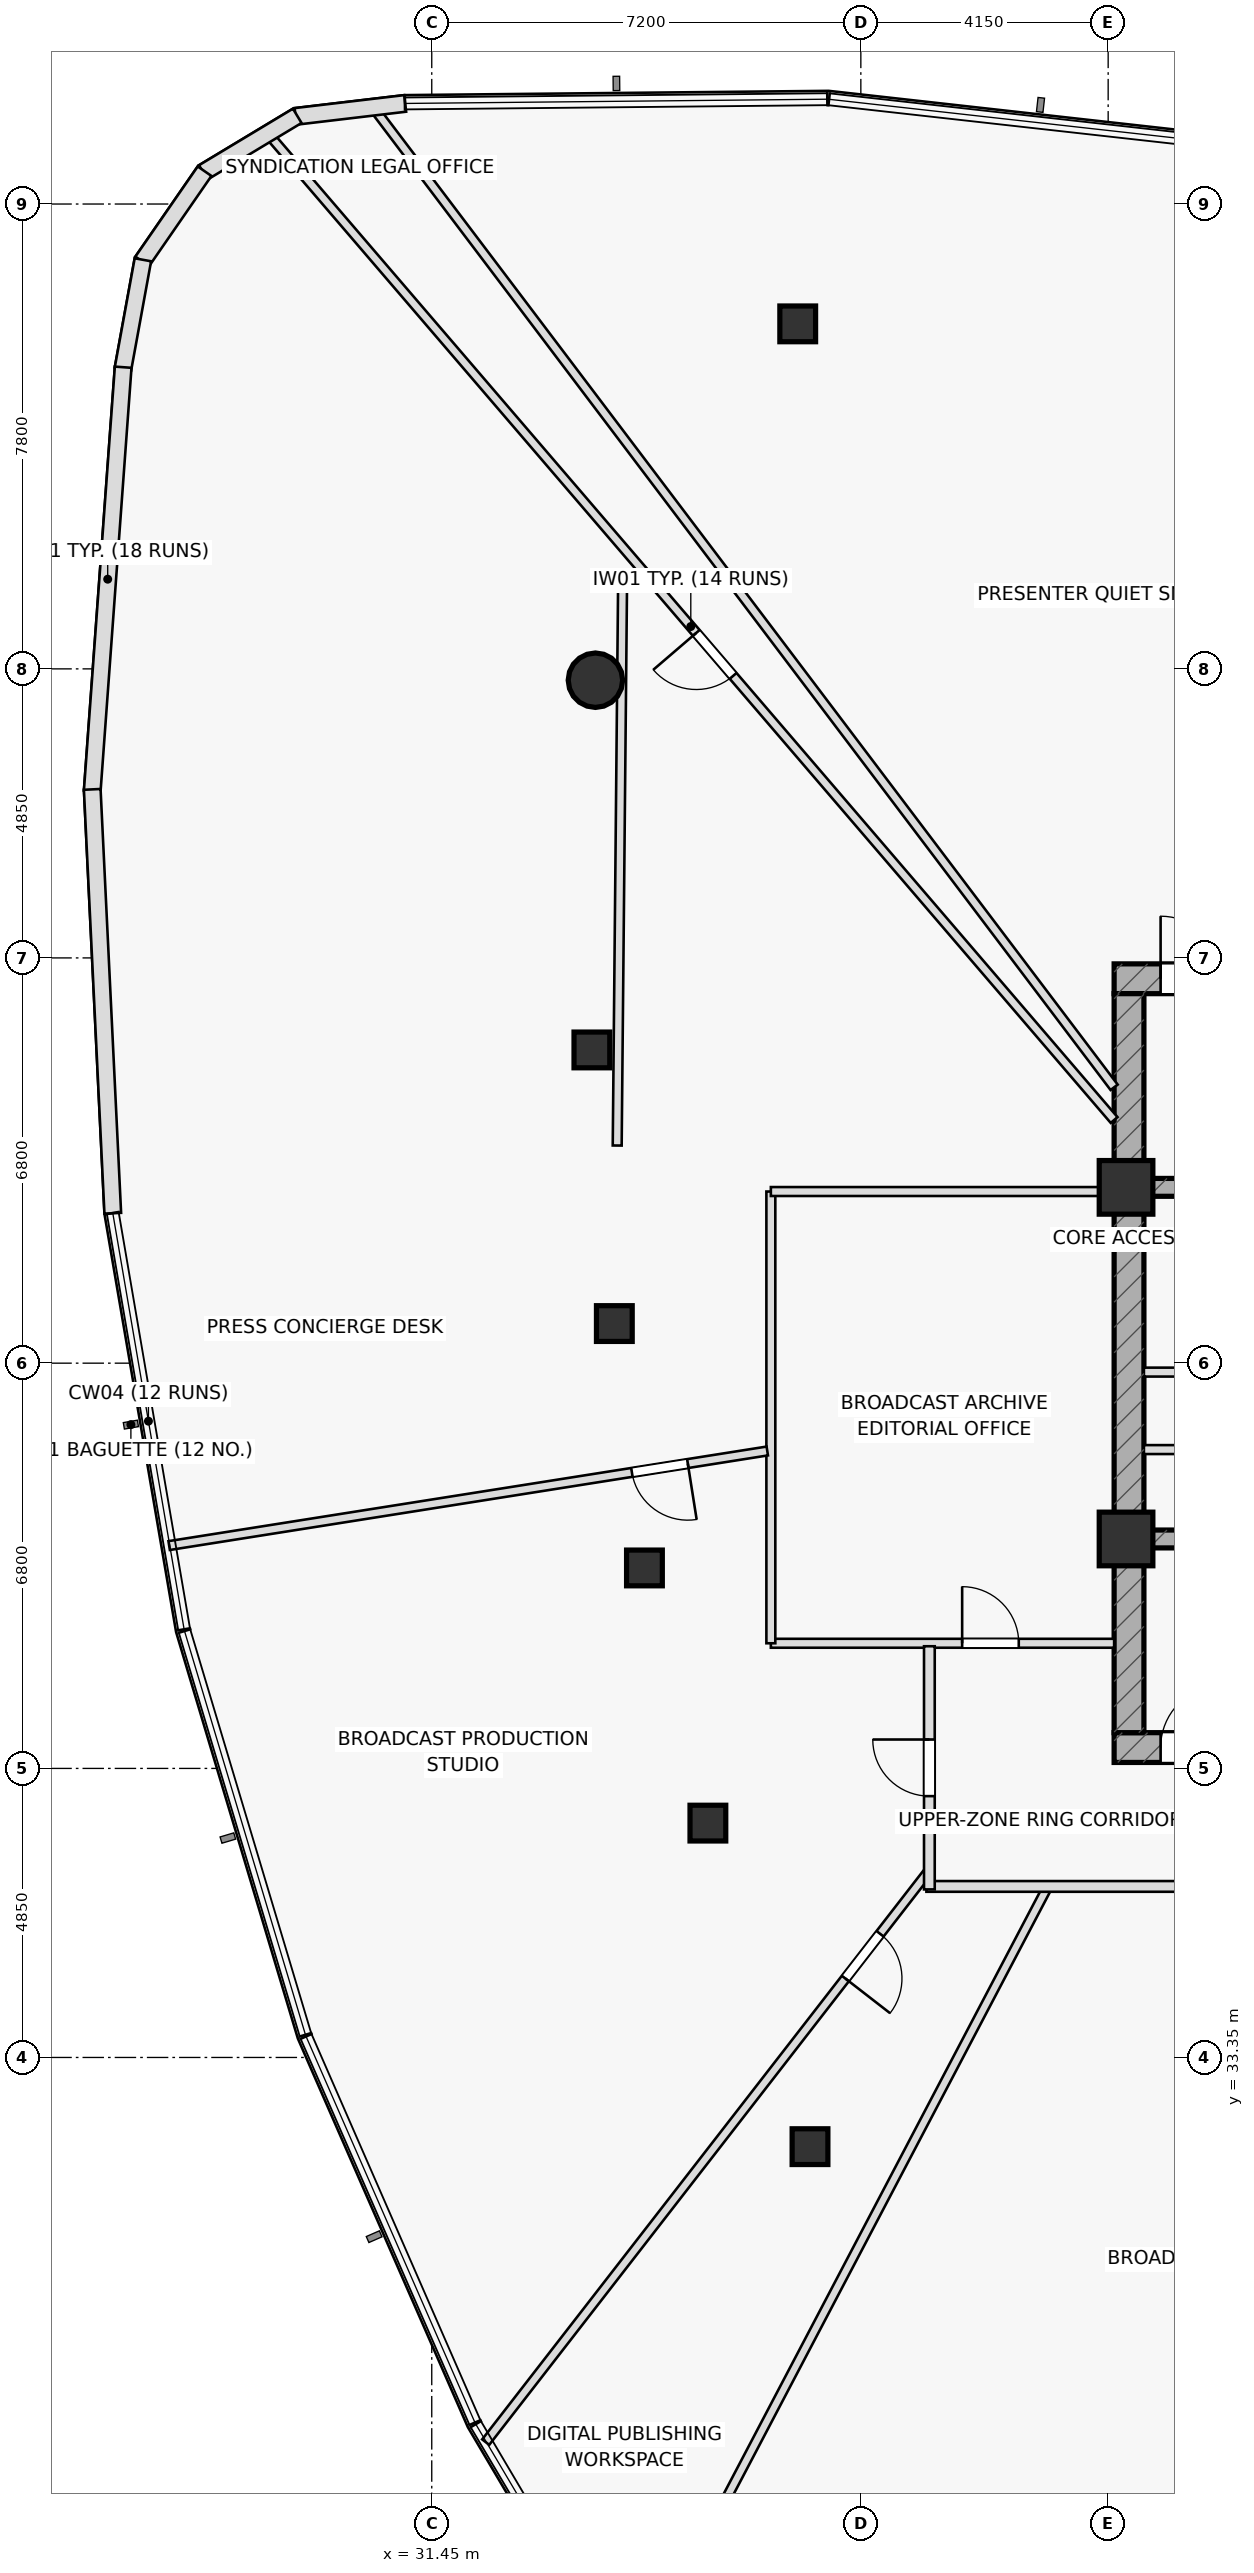
"""IFC4 building model, lengths in metres.
Left out: names, types, materials, properties, quantities, classifications, styles, units other than length and angle.
Written with IfcOpenShell. Run it as: python <this file> out.ifc"""

import sys

from ifc_helpers import new_model, si_unit, direction, frame, frame_2d, origin, origin_2d, place, context, subcontext, project, spatial, rectangle, hollow_rectangle, hollow_circle, extrude, element, fill, save


model = new_model("IFC4")
c1 = context("Model", 3, precision=1e-05, world=origin(), true_north=direction((0.0, 1.0)))
c2 = subcontext(c1, "Body", "Model", "MODEL_VIEW")
j1 = project(units=[si_unit("LENGTHUNIT", "METRE"), si_unit("PLANEANGLEUNIT", "RADIAN")], contexts=[c1])
p1 = place(None, origin())
s1 = spatial("IfcSite", under=j1, at=p1, CompositionType="ELEMENT")
p2 = place(p1, origin())
s2 = spatial("IfcBuilding", under=s1, at=p2, CompositionType="ELEMENT")
p3 = place(p2, frame((0.0, 0.0, 222.15)))
s3 = spatial("IfcBuildingStorey", under=s2, at=p3, CompositionType="ELEMENT", Elevation=222.15)
p4 = place(p3, frame((42.9, 51.45, 0.0), z_axis=(0.0, 0.0, 1.0), x_axis=(1.0, 0.0, 0.0)))
e1 = element("IfcWall", 1, at=p4, inside=s3, PredefinedType="SHEAR", context=c2, shape_type="SweptSolid", body=[
    extrude(rectangle(XDim=14.2, YDim=0.5, at=frame_2d((7.1, 0.0))), origin(), (0.0, 0.0, 1.0), 3.65),
])
p5 = place(p4, frame((0.78, 0.0, 0.0)))
e2 = element("IfcOpeningElement", 2, at=p5, cuts=e1, PredefinedType="OPENING", context=c2, shape_type="SweptSolid", body=[
    extrude(rectangle(XDim=1.05, YDim=2.2, at=frame_2d((0.525, 1.1))), frame((0.0, 0.26, 0.0), z_axis=(0.0, -1.0, 0.0), x_axis=(1.0, 0.0, 0.0)), (0.0, 0.0, 1.0), 0.52),
])
p6 = place(p3, frame((42.9, 38.55, 0.0), z_axis=(0.0, 0.0, 1.0), x_axis=(1.0, 0.0, 0.0)))
e3 = element("IfcWall", 3, at=p6, inside=s3, PredefinedType="SHEAR", context=c2, shape_type="SweptSolid", body=[
    extrude(rectangle(XDim=14.2, YDim=0.5, at=frame_2d((7.1, 0.0))), origin(), (0.0, 0.0, 1.0), 3.65),
])
p7 = place(p6, frame((0.78, 0.0, 0.0)))
e4 = element("IfcOpeningElement", 4, at=p7, cuts=e3, PredefinedType="OPENING", context=c2, shape_type="SweptSolid", body=[
    extrude(rectangle(XDim=1.05, YDim=2.2, at=frame_2d((0.525, 1.1))), frame((0.0, 0.26, 0.0), z_axis=(0.0, -1.0, 0.0), x_axis=(1.0, 0.0, 0.0)), (0.0, 0.0, 1.0), 0.52),
])
p8 = place(p3, frame((43.15, 38.8, 0.0), z_axis=(0.0, 0.0, 1.0), x_axis=(0.0, 1.0, 0.0)))
e5 = element("IfcWall", 5, at=p8, inside=s3, PredefinedType="SHEAR", context=c2, shape_type="SweptSolid", body=[
    extrude(rectangle(XDim=12.4, YDim=0.5, at=frame_2d((6.2, 0.0))), origin(), (0.0, 0.0, 1.0), 3.65),
])
p9 = place(p3, frame((43.4, 47.95, 0.0), z_axis=(0.0, 0.0, 1.0), x_axis=(1.0, 0.0, 0.0)))
e6 = element("IfcWall", 6, at=p9, inside=s3, PredefinedType="SHEAR", context=c2, shape_type="SweptSolid", body=[
    extrude(rectangle(XDim=13.2, YDim=0.3, at=frame_2d((6.6, 0.0))), origin(), (0.0, 0.0, 1.0), 3.65),
])
p10 = place(p9, frame((8.345, 0.0, 0.0)))
e7 = element("IfcOpeningElement", 7, at=p10, cuts=e6, PredefinedType="OPENING", context=c2, shape_type="SweptSolid", body=[
    extrude(rectangle(XDim=1.15, YDim=2.2, at=frame_2d((0.575, 1.1))), frame((0.0, 0.16, 0.0), z_axis=(0.0, -1.0, 0.0), x_axis=(1.0, 0.0, 0.0)), (0.0, 0.0, 1.0), 0.32),
])
p11 = place(p9, frame((10.065, 0.0, 0.0)))
e8 = element("IfcOpeningElement", 8, at=p11, cuts=e6, PredefinedType="OPENING", context=c2, shape_type="SweptSolid", body=[
    extrude(rectangle(XDim=1.15, YDim=2.2, at=frame_2d((0.575, 1.1))), frame((0.0, 0.16, 0.0), z_axis=(0.0, -1.0, 0.0), x_axis=(1.0, 0.0, 0.0)), (0.0, 0.0, 1.0), 0.32),
])
p12 = place(p9, frame((11.645, 0.0, 0.0)))
e9 = element("IfcOpeningElement", 9, at=p12, cuts=e6, PredefinedType="OPENING", context=c2, shape_type="SweptSolid", body=[
    extrude(rectangle(XDim=1.15, YDim=2.2, at=frame_2d((0.575, 1.1))), frame((0.0, 0.16, 0.0), z_axis=(0.0, -1.0, 0.0), x_axis=(1.0, 0.0, 0.0)), (0.0, 0.0, 1.0), 0.32),
])
p13 = place(p3, frame((43.4, 42.05, 0.0), z_axis=(0.0, 0.0, 1.0), x_axis=(1.0, 0.0, 0.0)))
e10 = element("IfcWall", 10, at=p13, inside=s3, PredefinedType="SHEAR", context=c2, shape_type="SweptSolid", body=[
    extrude(rectangle(XDim=13.2, YDim=0.3, at=frame_2d((6.6, 0.0))), origin(), (0.0, 0.0, 1.0), 3.65),
])
for number, where, z_axis, x_axis in (
    (11, (43.1, 47.95, 0.0), (0.0, 0.0, 1.0), (1.0, 0.0, 0.0)),
    (12, (43.1, 42.05, 0.0), (0.0, 0.0, 1.0), (1.0, 0.0, 0.0)),
):
    element("IfcColumn", number, at=place(p3, frame(where, z_axis=z_axis, x_axis=x_axis)), inside=s3, PredefinedType="COLUMN", context=c2, shape_type="SweptSolid", body=[
        extrude(rectangle(XDim=0.9, YDim=0.9, at=origin_2d()), origin(), (0.0, 0.0, 1.0), 3.65),
    ])
p14 = place(p3, frame((34.196, 56.46, 0.0), z_axis=(0.0, 0.0, 1.0), x_axis=(1.0, 0.0, 0.0)))
e13 = element("IfcColumn", 13, at=p14, inside=s3, PredefinedType="COLUMN", context=c2, shape_type="SweptSolid", body=[
    extrude(hollow_circle(Radius=0.457, WallThickness=0.04, at=origin_2d()), origin(), (0.0, 0.0, 1.0), 3.65),
])
for number, where, z_axis, x_axis in (
    (14, (34.137, 50.256, 0.0), (0.0, 0.0, 1.0), (1.0, 0.0, 0.0)),
    (15, (34.514, 45.665, 0.0), (0.0, 0.0, 1.0), (1.0, 0.0, 0.0)),
    (16, (35.019, 41.564, 0.0), (0.0, 0.0, 1.0), (1.0, 0.0, 0.0)),
    (17, (36.083, 37.282, 0.0), (0.0, 0.0, 1.0), (1.0, 0.0, 0.0)),
    (18, (37.797, 31.853, 0.0), (0.0, 0.0, 1.0), (1.0, 0.0, 0.0)),
    (19, (37.591, 62.439, 0.0), (0.0, 0.0, 1.0), (1.0, 0.0, 0.0)),
):
    element("IfcColumn", number, at=place(p3, frame(where, z_axis=z_axis, x_axis=x_axis)), inside=s3, PredefinedType="COLUMN", context=c2, shape_type="SweptSolid", body=[
        extrude(hollow_rectangle(XDim=0.6, YDim=0.6, WallThickness=0.036, at=origin_2d()), origin(), (0.0, 0.0, 1.0), 3.65),
    ])
for number, where, z_axis, x_axis in (
    (20, (43.4, 43.55, 0.0), (0.0, 0.0, 1.0), (1.0, 0.0, 0.0)),
    (21, (43.4, 44.85, 0.0), (0.0, 0.0, 1.0), (1.0, 0.0, 0.0)),
):
    element("IfcWall", number, at=place(p3, frame(where, z_axis=z_axis, x_axis=x_axis)), inside=s3, PredefinedType="PARTITIONING", context=c2, shape_type="SweptSolid", body=[
        extrude(rectangle(XDim=2.35, YDim=0.15, at=frame_2d((1.175, 0.0))), origin(), (0.0, 0.0, 1.0), 3.65),
    ])
p15 = place(p3, frame((34.652, 58.056, 0.0), z_axis=(0.0, 0.0, 1.0), x_axis=(-0.009553538759, -0.999954363907, 0.0)))
e22 = element("IfcWall", 22, at=p15, inside=s3, PredefinedType="PARTITIONING", context=c2, shape_type="SweptSolid", body=[
    extrude(rectangle(XDim=9.404, YDim=0.15, at=frame_2d((4.702, 0.0))), origin(), (0.0, 0.0, 1.0), 3.135),
])
p16 = place(p3, frame((37.14, 40.3, 0.0), z_axis=(0.0, 0.0, 1.0), x_axis=(1.0, 0.0, 0.0)))
e23 = element("IfcWall", 23, at=p16, inside=s3, PredefinedType="PARTITIONING", context=c2, shape_type="SweptSolid", body=[
    extrude(rectangle(XDim=5.76, YDim=0.15, at=frame_2d((2.88, 0.0))), origin(), (0.0, 0.0, 1.0), 3.025),
])
p17 = place(p16, frame((3.21, 0.0, 0.0)))
e24 = element("IfcOpeningElement", 24, at=p17, cuts=e23, PredefinedType="OPENING", context=c2, shape_type="SweptSolid", body=[
    extrude(rectangle(XDim=0.95, YDim=2.05, at=frame_2d((0.475, 1.025))), frame((0.0, 0.085, 0.0), z_axis=(0.0, -1.0, 0.0), x_axis=(1.0, 0.0, 0.0)), (0.0, 0.0, 1.0), 0.17),
])
p18 = place(p3, frame((37.14, 40.3, 0.0), z_axis=(0.0, 0.0, 1.0), x_axis=(0.0, 1.0, 0.0)))
e25 = element("IfcWall", 25, at=p18, inside=s3, PredefinedType="PARTITIONING", context=c2, shape_type="SweptSolid", body=[
    extrude(rectangle(XDim=7.58, YDim=0.15, at=frame_2d((3.79, 0.0))), origin(), (0.0, 0.0, 1.0), 3.65),
])
p19 = place(p3, frame((37.14, 47.88, 0.0), z_axis=(0.0, 0.0, 1.0), x_axis=(1.0, 0.0, 0.0)))
e26 = element("IfcWall", 26, at=p19, inside=s3, PredefinedType="PARTITIONING", context=c2, shape_type="SweptSolid", body=[
    extrude(rectangle(XDim=5.76, YDim=0.15, at=frame_2d((2.88, 0.0))), origin(), (0.0, 0.0, 1.0), 3.025),
])
p20 = place(p3, frame((42.9, 49.629, 0.0), z_axis=(0.0, 0.0, 1.0), x_axis=(-0.603127375297, 0.797644889138, 0.0)))
e27 = element("IfcWall", 27, at=p20, inside=s3, PredefinedType="PARTITIONING", context=c2, shape_type="SweptSolid", body=[
    extrude(rectangle(XDim=20.629, YDim=0.15, at=frame_2d((10.314, 0.0))), origin(), (0.0, 0.0, 1.0), 3.025),
])
p21 = place(p3, frame((42.9, 49.08, 0.0), z_axis=(0.0, 0.0, 1.0), x_axis=(-0.651097245438, 0.758994319467, 0.0)))
e28 = element("IfcWall", 28, at=p21, inside=s3, PredefinedType="PARTITIONING", context=c2, shape_type="SweptSolid", body=[
    extrude(rectangle(XDim=21.819, YDim=0.15, at=frame_2d((10.91, 0.0))), origin(), (0.0, 0.0, 1.0), 3.025),
])
p22 = place(p21, frame((9.819, 0.0, 0.0)))
e29 = element("IfcOpeningElement", 29, at=p22, cuts=e28, PredefinedType="OPENING", context=c2, shape_type="SweptSolid", body=[
    extrude(rectangle(XDim=0.95, YDim=2.05, at=frame_2d((0.475, 1.025))), frame((0.0, 0.085, 0.0), z_axis=(0.0, -1.0, 0.0), x_axis=(1.0, 0.0, 0.0)), (0.0, 0.0, 1.0), 0.17),
])
p23 = place(p3, frame((37.08, 43.526, 0.0), z_axis=(0.0, 0.0, 1.0), x_axis=(-0.987725532743, -0.156199462122, 0.0)))
e30 = element("IfcWall", 30, at=p23, inside=s3, PredefinedType="PARTITIONING", context=c2, shape_type="SweptSolid", body=[
    extrude(rectangle(XDim=10.161, YDim=0.15, at=frame_2d((5.081, 0.0))), origin(), (0.0, 0.0, 1.0), 3.135),
])
p24 = place(p23, frame((1.35, 0.0, 0.0)))
e31 = element("IfcOpeningElement", 31, at=p24, cuts=e30, PredefinedType="OPENING", context=c2, shape_type="SweptSolid", body=[
    extrude(rectangle(XDim=0.95, YDim=2.05, at=frame_2d((0.475, 1.025))), frame((0.0, 0.085, 0.0), z_axis=(0.0, -1.0, 0.0), x_axis=(1.0, 0.0, 0.0)), (0.0, 0.0, 1.0), 0.17),
])
p25 = place(p3, frame((39.8, 36.492, 0.0), z_axis=(0.0, 0.0, 1.0), x_axis=(-0.612952103667, -0.790120065946, 0.0)))
e32 = element("IfcWall", 32, at=p25, inside=s3, PredefinedType="PARTITIONING", context=c2, shape_type="SweptSolid", body=[
    extrude(rectangle(XDim=12.146, YDim=0.15, at=frame_2d((6.073, 0.0))), origin(), (0.0, 0.0, 1.0), 3.135),
])
p26 = place(p25, frame((1.35, 0.0, 0.0)))
e33 = element("IfcOpeningElement", 33, at=p26, cuts=e32, PredefinedType="OPENING", context=c2, shape_type="SweptSolid", body=[
    extrude(rectangle(XDim=0.95, YDim=2.05, at=frame_2d((0.475, 1.025))), frame((0.0, 0.085, 0.0), z_axis=(0.0, -1.0, 0.0), x_axis=(1.0, 0.0, 0.0)), (0.0, 0.0, 1.0), 0.17),
])
p27 = place(p3, frame((41.788, 36.22, 0.0), z_axis=(0.0, 0.0, 1.0), x_axis=(-0.465038288732, -0.885290568126, 0.0)))
e34 = element("IfcWall", 34, at=p27, inside=s3, PredefinedType="PARTITIONING", context=c2, shape_type="SweptSolid", body=[
    extrude(rectangle(XDim=15.122, YDim=0.15, at=frame_2d((7.561, 0.0))), origin(), (0.0, 0.0, 1.0), 3.135),
])
p28 = place(p3, frame((59.23, 36.22, 0.0), z_axis=(0.0, 0.0, 1.0), x_axis=(-1.0, 0.0, 0.0)))
e35 = element("IfcWall", 35, at=p28, inside=s3, PredefinedType="PARTITIONING", context=c2, shape_type="SweptSolid", body=[
    extrude(rectangle(XDim=19.48, YDim=0.18, at=frame_2d((9.74, 0.0))), origin(), (0.0, 0.0, 1.0), 3.025),
])
p29 = place(p28, frame((4.917, 0.0, 0.0)))
e36 = element("IfcOpeningElement", 36, at=p29, cuts=e35, PredefinedType="OPENING", context=c2, shape_type="SweptSolid", body=[
    extrude(rectangle(XDim=0.95, YDim=2.05, at=frame_2d((0.475, 1.025))), frame((0.0, 0.1, 0.0), z_axis=(0.0, -1.0, 0.0), x_axis=(1.0, 0.0, 0.0)), (0.0, 0.0, 1.0), 0.2),
])
p30 = place(p28, frame((13.328, 0.0, 0.0)))
e37 = element("IfcOpeningElement", 37, at=p30, cuts=e35, PredefinedType="OPENING", context=c2, shape_type="SweptSolid", body=[
    extrude(rectangle(XDim=0.95, YDim=2.05, at=frame_2d((0.475, 1.025))), frame((0.0, 0.1, 0.0), z_axis=(0.0, -1.0, 0.0), x_axis=(1.0, 0.0, 0.0)), (0.0, 0.0, 1.0), 0.2),
])
p31 = place(p3, frame((39.8, 36.17, 0.0), z_axis=(0.0, 0.0, 1.0), x_axis=(0.0, 1.0, 0.0)))
e38 = element("IfcWall", 38, at=p31, inside=s3, PredefinedType="PARTITIONING", context=c2, shape_type="SweptSolid", body=[
    extrude(rectangle(XDim=4.08, YDim=0.18, at=frame_2d((2.04, 0.0))), origin(), (0.0, 0.0, 1.0), 3.325),
])
p32 = place(p31, frame((1.565, 0.0, 0.0)))
e39 = element("IfcOpeningElement", 39, at=p32, cuts=e38, PredefinedType="OPENING", context=c2, shape_type="SweptSolid", body=[
    extrude(rectangle(XDim=0.95, YDim=2.05, at=frame_2d((0.475, 1.025))), frame((0.0, 0.1, 0.0), z_axis=(0.0, -1.0, 0.0), x_axis=(1.0, 0.0, 0.0)), (0.0, 0.0, 1.0), 0.2),
])
p33 = place(p3, frame((31.004, 66.138, 0.0), z_axis=(0.0, 0.0, 1.0), x_axis=(-0.993058488842, -0.117621587046, 0.0)))
e40 = element("IfcWall", 40, at=p33, inside=s3, PredefinedType="STANDARD", context=c2, shape_type="SweptSolid", body=[
    extrude(rectangle(XDim=1.852, YDim=0.28, at=frame_2d((0.926, 0.0))), origin(), (0.0, 0.0, 1.0), 3.65),
])
p34 = place(p3, frame((29.193, 65.93, 0.0), z_axis=(0.0, 0.0, 1.0), x_axis=(-0.856707441175, -0.515802636903, 0.0)))
e41 = element("IfcWall", 41, at=p34, inside=s3, PredefinedType="STANDARD", context=c2, shape_type="SweptSolid", body=[
    extrude(rectangle(XDim=1.84, YDim=0.28, at=frame_2d((0.92, 0.0))), origin(), (0.0, 0.0, 1.0), 3.65),
])
p35 = place(p3, frame((27.638, 65.001, 0.0), z_axis=(0.0, 0.0, 1.0), x_axis=(-0.568554335076, -0.822645712361, 0.0)))
e42 = element("IfcWall", 42, at=p35, inside=s3, PredefinedType="STANDARD", context=c2, shape_type="SweptSolid", body=[
    extrude(rectangle(XDim=1.84, YDim=0.28, at=frame_2d((0.92, 0.0))), origin(), (0.0, 0.0, 1.0), 3.65),
])
p36 = place(p3, frame((26.603, 63.514, 0.0), z_axis=(0.0, 0.0, 1.0), x_axis=(-0.179704335153, -0.983720667632, 0.0)))
e43 = element("IfcWall", 43, at=p36, inside=s3, PredefinedType="STANDARD", context=c2, shape_type="SweptSolid", body=[
    extrude(rectangle(XDim=1.863, YDim=0.28, at=frame_2d((0.931, 0.0))), origin(), (0.0, 0.0, 1.0), 3.65),
])
p37 = place(p3, frame((26.272, 61.712, 0.0), z_axis=(0.0, 0.0, 1.0), x_axis=(-0.072835306407, -0.997343981854, 0.0)))
e44 = element("IfcWall", 44, at=p37, inside=s3, PredefinedType="STANDARD", context=c2, shape_type="SweptSolid", body=[
    extrude(rectangle(XDim=7.133, YDim=0.28, at=frame_2d((3.566, 0.0))), origin(), (0.0, 0.0, 1.0), 3.65),
])
p38 = place(p3, frame((25.753, 54.628, 0.0), z_axis=(0.0, 0.0, 1.0), x_axis=(0.04837634202, -0.998829179356, 0.0)))
e45 = element("IfcWall", 45, at=p38, inside=s3, PredefinedType="STANDARD", context=c2, shape_type="SweptSolid", body=[
    extrude(rectangle(XDim=7.121, YDim=0.28, at=frame_2d((3.561, 0.0))), origin(), (0.0, 0.0, 1.0), 3.65),
])
p39 = place(p5, origin())
e46 = element("IfcDoor", 46, at=p39, inside=s3, OperationType="SINGLE_SWING_LEFT", PredefinedType="DOOR", context=c2, shape_type="SweptSolid", body=[
    extrude(rectangle(XDim=1.05, YDim=2.2, at=frame_2d((0.525, 1.1))), frame((0.0, 0.025, 0.0), z_axis=(0.0, -1.0, 0.0), x_axis=(1.0, 0.0, 0.0)), (0.0, 0.0, 1.0), 0.05),
])
fill(e2, e46)
p40 = place(p7, origin())
e47 = element("IfcDoor", 47, at=p40, inside=s3, OperationType="SINGLE_SWING_RIGHT", PredefinedType="DOOR", context=c2, shape_type="SweptSolid", body=[
    extrude(rectangle(XDim=1.05, YDim=2.2, at=frame_2d((0.525, 1.1))), frame((0.0, 0.025, 0.0), z_axis=(0.0, -1.0, 0.0), x_axis=(1.0, 0.0, 0.0)), (0.0, 0.0, 1.0), 0.05),
])
fill(e4, e47)
p41 = place(p17, origin())
e48 = element("IfcDoor", 48, at=p41, inside=s3, OperationType="SINGLE_SWING_LEFT", PredefinedType="DOOR", context=c2, shape_type="SweptSolid", body=[
    extrude(rectangle(XDim=0.95, YDim=2.05, at=frame_2d((0.475, 1.025))), frame((0.0, 0.025, 0.0), z_axis=(0.0, -1.0, 0.0), x_axis=(1.0, 0.0, 0.0)), (0.0, 0.0, 1.0), 0.05),
])
fill(e24, e48)
p42 = place(p22, origin())
e49 = element("IfcDoor", 49, at=p42, inside=s3, OperationType="SINGLE_SWING_RIGHT", PredefinedType="DOOR", context=c2, shape_type="SweptSolid", body=[
    extrude(rectangle(XDim=0.95, YDim=2.05, at=frame_2d((0.475, 1.025))), frame((0.0, 0.025, 0.0), z_axis=(0.0, -1.0, 0.0), x_axis=(1.0, 0.0, 0.0)), (0.0, 0.0, 1.0), 0.05),
])
fill(e29, e49)
p43 = place(p24, origin())
e50 = element("IfcDoor", 50, at=p43, inside=s3, OperationType="SINGLE_SWING_LEFT", PredefinedType="DOOR", context=c2, shape_type="SweptSolid", body=[
    extrude(rectangle(XDim=0.95, YDim=2.05, at=frame_2d((0.475, 1.025))), frame((0.0, 0.025, 0.0), z_axis=(0.0, -1.0, 0.0), x_axis=(1.0, 0.0, 0.0)), (0.0, 0.0, 1.0), 0.05),
])
fill(e31, e50)
p44 = place(p26, origin())
e51 = element("IfcDoor", 51, at=p44, inside=s3, OperationType="SINGLE_SWING_RIGHT", PredefinedType="DOOR", context=c2, shape_type="SweptSolid", body=[
    extrude(rectangle(XDim=0.95, YDim=2.05, at=frame_2d((0.475, 1.025))), frame((0.0, 0.025, 0.0), z_axis=(0.0, -1.0, 0.0), x_axis=(1.0, 0.0, 0.0)), (0.0, 0.0, 1.0), 0.05),
])
fill(e33, e51)
p45 = place(p32, origin())
e52 = element("IfcDoor", 52, at=p45, inside=s3, OperationType="SINGLE_SWING_RIGHT", PredefinedType="DOOR", context=c2, shape_type="SweptSolid", body=[
    extrude(rectangle(XDim=0.95, YDim=2.05, at=frame_2d((0.475, 1.025))), frame((0.0, 0.025, 0.0), z_axis=(0.0, -1.0, 0.0), x_axis=(1.0, 0.0, 0.0)), (0.0, 0.0, 1.0), 0.05),
])
fill(e39, e52)
save(model, sys.argv[1])
